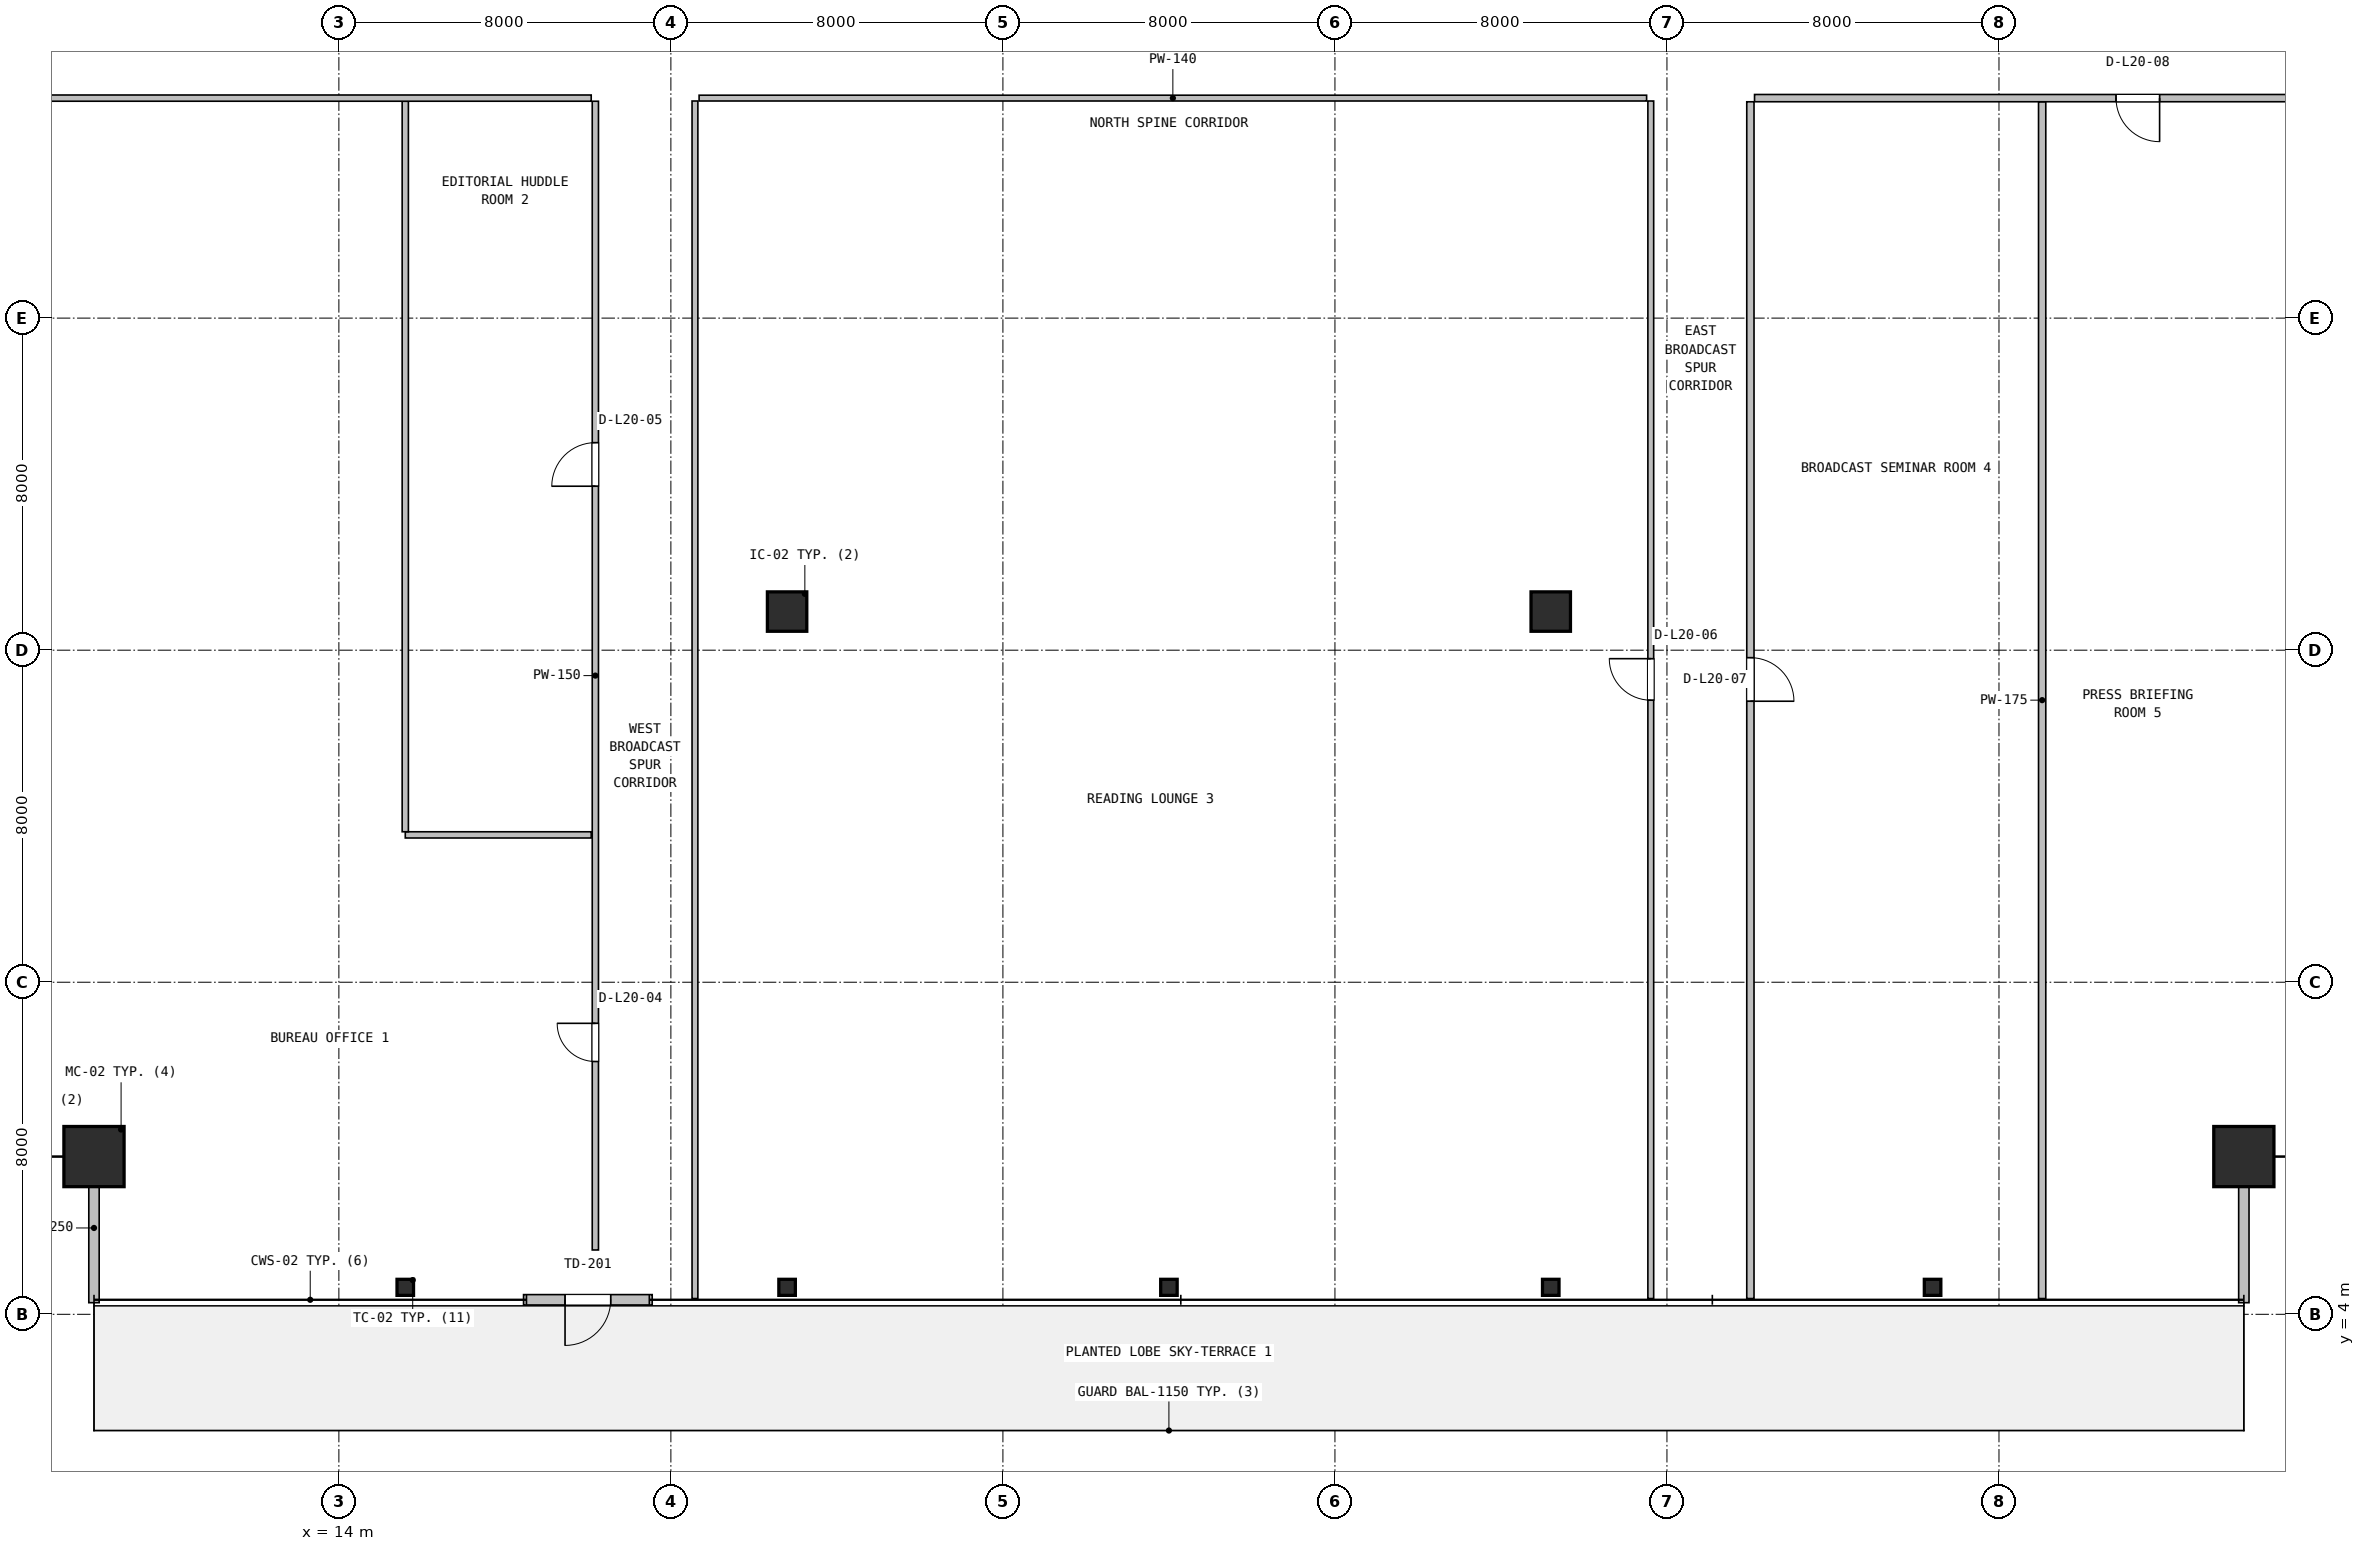
"""IFC4 building model, lengths in metres.
Left out: names, types, materials, properties, quantities, classifications, styles, units other than length and angle.
Written with IfcOpenShell. Run it as: python <this file> out.ifc"""

import sys

from ifc_helpers import new_model, si_unit, direction, frame, frame_2d, origin, origin_2d, place, context, subcontext, project, spatial, rectangle, hollow_rectangle, i_section, extrude, source, transform, mapped, element, fill, save


model = new_model("IFC4")
c1 = context("Model", 3, precision=1e-05, world=origin(), true_north=direction((0.0, 1.0)))
c2 = subcontext(c1, "Body", "Model", "MODEL_VIEW")
j1 = project(units=[si_unit("LENGTHUNIT", "METRE"), si_unit("PLANEANGLEUNIT", "RADIAN")], contexts=[c1])
p1 = place(None, origin())
s1 = spatial("IfcSite", under=j1, at=p1, CompositionType="ELEMENT")
p2 = place(p1, origin())
s2 = spatial("IfcBuilding", under=s1, at=p2, CompositionType="ELEMENT")
p3 = place(p2, frame((0.0, 0.0, 87.0)))
s3 = spatial("IfcBuildingStorey", under=s2, at=p3, CompositionType="ELEMENT", Elevation=87.0)
m1 = source(origin(), c2, "Body", "SweptSolid", [
    extrude(hollow_rectangle(XDim=1.45, YDim=1.45, WallThickness=0.055, at=origin_2d()), origin(), (0.0, 0.0, 1.0), 3.8),
])
for number, where, z_axis, x_axis in (
    (1, (8.1, 7.8, 0.0), (0.0, 0.0, 1.0), (1.0, 0.0, 0.0)),
    (2, (59.9, 7.8, 0.0), (0.0, 0.0, 1.0), (1.0, 0.0, 0.0)),
):
    element("IfcColumn", number, at=place(p3, frame(where, z_axis=z_axis, x_axis=x_axis)), inside=s3, PredefinedType="COLUMN", context=c2, shape_type="MappedRepresentation", body=[
        mapped(m1, transform((0.0, 0.0, 0.0), x_axis=(1.0, 0.0, 0.0), y_axis=(0.0, 1.0, 0.0), z_axis=(0.0, 0.0, 1.0), scale=1.0)),
    ])
m2 = source(origin(), c2, "Body", "SweptSolid", [
    extrude(i_section(OverallWidth=0.398, OverallDepth=0.387, WebThickness=0.021, FlangeThickness=0.033, FilletRadius=0.018, at=origin_2d()), origin(), (0.0, 0.0, 1.0), 3.8),
])
for number, where, z_axis, x_axis in (
    (3, (15.6, 4.65, 0.0), (0.0, 0.0, 1.0), (1.0, 0.0, 0.0)),
    (4, (24.8, 4.65, 0.0), (0.0, 0.0, 1.0), (1.0, 0.0, 0.0)),
    (5, (34.0, 4.65, 0.0), (0.0, 0.0, 1.0), (1.0, 0.0, 0.0)),
    (6, (43.2, 4.65, 0.0), (0.0, 0.0, 1.0), (1.0, 0.0, 0.0)),
    (7, (52.4, 4.65, 0.0), (0.0, 0.0, 1.0), (1.0, 0.0, 0.0)),
):
    element("IfcColumn", number, at=place(p3, frame(where, z_axis=z_axis, x_axis=x_axis)), inside=s3, PredefinedType="COLUMN", context=c2, shape_type="MappedRepresentation", body=[
        mapped(m2, transform((0.0, 0.0, 0.0), x_axis=(1.0, 0.0, 0.0), y_axis=(0.0, 1.0, 0.0), z_axis=(0.0, 0.0, 1.0), scale=1.0)),
    ])
m3 = source(origin(), c2, "Body", "SweptSolid", [
    extrude(rectangle(XDim=0.95, YDim=0.95, at=origin_2d()), origin(), (0.0, 0.0, 1.0), 3.8),
])
for number, where, z_axis, x_axis in (
    (8, (24.8, 20.93, 0.0), (0.0, 0.0, 1.0), (1.0, 0.0, 0.0)),
    (9, (43.2, 20.93, 0.0), (0.0, 0.0, 1.0), (1.0, 0.0, 0.0)),
):
    element("IfcColumn", number, at=place(p3, frame(where, z_axis=z_axis, x_axis=x_axis)), inside=s3, PredefinedType="COLUMN", context=c2, shape_type="MappedRepresentation", body=[
        mapped(m3, transform((0.0, 0.0, 0.0), x_axis=(1.0, 0.0, 0.0), y_axis=(0.0, 1.0, 0.0), z_axis=(0.0, 0.0, 1.0), scale=1.0)),
    ])
p4 = place(p3, frame((18.45, 4.35, 0.0), z_axis=(0.0, 0.0, 1.0), x_axis=(1.0, 0.0, 0.0)))
e10 = element("IfcWall", 10, at=p4, inside=s3, PredefinedType="SOLIDWALL", context=c2, shape_type="SweptSolid", body=[
    extrude(rectangle(XDim=3.1, YDim=0.25, at=frame_2d((1.55, 0.0))), origin(), (0.0, 0.0, 1.0), 3.53),
])
p5 = place(p4, frame((1.0, 0.0, 0.0)))
e11 = element("IfcOpeningElement", 11, at=p5, cuts=e10, PredefinedType="OPENING", context=c2, shape_type="SweptSolid", body=[
    extrude(rectangle(XDim=1.1, YDim=2.15, at=frame_2d((0.55, 1.075))), frame((0.0, 0.135, 0.0), z_axis=(0.0, -1.0, 0.0), x_axis=(1.0, 0.0, 0.0)), (0.0, 0.0, 1.0), 0.27),
])
for number, where, z_axis, x_axis in (
    (12, (8.1, 4.28, 0.0), (0.0, 0.0, 1.0), (0.0, 1.0, 0.0)),
    (13, (59.9, 4.28, 0.0), (0.0, 0.0, 1.0), (0.0, 1.0, 0.0)),
):
    element("IfcWall", number, at=place(p3, frame(where, z_axis=z_axis, x_axis=x_axis)), inside=s3, PredefinedType="SOLIDWALL", context=c2, shape_type="SweptSolid", body=[
        extrude(rectangle(XDim=3.6, YDim=0.25, at=frame_2d((1.8, 0.0))), origin(), (0.0, 0.0, 1.0), 3.108),
    ])
p6 = place(p3, frame((20.18, 5.55, 0.0), z_axis=(0.0, 0.0, 1.0), x_axis=(0.0, 1.0, 0.0)))
e14 = element("IfcWall", 14, at=p6, inside=s3, PredefinedType="PARTITIONING", context=c2, shape_type="SweptSolid", body=[
    extrude(rectangle(XDim=27.675, YDim=0.15, at=frame_2d((13.837, 0.0))), origin(), (0.0, 0.0, 1.0), 3.222),
])
p7 = place(p6, frame((4.54, 0.0, 0.0)))
e15 = element("IfcOpeningElement", 15, at=p7, cuts=e14, PredefinedType="OPENING", context=c2, shape_type="SweptSolid", body=[
    extrude(rectangle(XDim=0.92, YDim=2.08, at=frame_2d((0.46, 1.04))), frame((0.0, 0.085, 0.0), z_axis=(0.0, -1.0, 0.0), x_axis=(1.0, 0.0, 0.0)), (0.0, 0.0, 1.0), 0.17),
])
p8 = place(p6, frame((18.4, 0.0, 0.0)))
e16 = element("IfcOpeningElement", 16, at=p8, cuts=e14, PredefinedType="OPENING", context=c2, shape_type="SweptSolid", body=[
    extrude(rectangle(XDim=1.05, YDim=2.1, at=frame_2d((0.525, 1.05))), frame((0.0, 0.085, 0.0), z_axis=(0.0, -1.0, 0.0), x_axis=(1.0, 0.0, 0.0)), (0.0, 0.0, 1.0), 0.17),
])
p9 = place(p3, frame((15.6, 15.55, 0.0), z_axis=(0.0, 0.0, 1.0), x_axis=(1.0, 0.0, 0.0)))
e17 = element("IfcWall", 17, at=p9, inside=s3, PredefinedType="PARTITIONING", context=c2, shape_type="SweptSolid", body=[
    extrude(rectangle(XDim=4.48, YDim=0.15, at=frame_2d((2.24, 0.0))), origin(), (0.0, 0.0, 1.0), 3.53),
])
p10 = place(p3, frame((15.6, 15.625, 0.0), z_axis=(0.0, 0.0, 1.0), x_axis=(0.0, 1.0, 0.0)))
e18 = element("IfcWall", 18, at=p10, inside=s3, PredefinedType="PARTITIONING", context=c2, shape_type="SweptSolid", body=[
    extrude(rectangle(XDim=17.6, YDim=0.15, at=frame_2d((8.8, 0.0))), origin(), (0.0, 0.0, 1.0), 3.222),
])
p11 = place(p3, frame((4.68, 33.3, 0.0), z_axis=(0.0, 0.0, 1.0), x_axis=(1.0, 0.0, 0.0)))
e19 = element("IfcWall", 19, at=p11, inside=s3, PredefinedType="PARTITIONING", context=c2, shape_type="SweptSolid", body=[
    extrude(rectangle(XDim=15.4, YDim=0.15, at=frame_2d((7.7, 0.0))), origin(), (0.0, 0.0, 1.0), 3.108),
])
p12 = place(p3, frame((45.61, 4.38, 0.0), z_axis=(0.0, 0.0, 1.0), x_axis=(0.0, 1.0, 0.0)))
e20 = element("IfcWall", 20, at=p12, inside=s3, PredefinedType="PARTITIONING", context=c2, shape_type="SweptSolid", body=[
    extrude(rectangle(XDim=28.85, YDim=0.14, at=frame_2d((14.425, 0.0))), origin(), (0.0, 0.0, 1.0), 3.108),
])
p13 = place(p12, frame((14.415, 0.0, 0.0)))
e21 = element("IfcOpeningElement", 21, at=p13, cuts=e20, PredefinedType="OPENING", context=c2, shape_type="SweptSolid", body=[
    extrude(rectangle(XDim=1.0, YDim=2.1, at=frame_2d((0.5, 1.05))), frame((0.0, 0.08, 0.0), z_axis=(0.0, -1.0, 0.0), x_axis=(1.0, 0.0, 0.0)), (0.0, 0.0, 1.0), 0.16),
])
p14 = place(p3, frame((22.68, 33.3, 0.0), z_axis=(0.0, 0.0, 1.0), x_axis=(1.0, 0.0, 0.0)))
e22 = element("IfcWall", 22, at=p14, inside=s3, PredefinedType="PARTITIONING", context=c2, shape_type="SweptSolid", body=[
    extrude(rectangle(XDim=22.83, YDim=0.14, at=frame_2d((11.415, 0.0))), origin(), (0.0, 0.0, 1.0), 2.83),
])
p15 = place(p3, frame((22.58, 4.38, 0.0), z_axis=(0.0, 0.0, 1.0), x_axis=(0.0, 1.0, 0.0)))
e23 = element("IfcWall", 23, at=p15, inside=s3, PredefinedType="PARTITIONING", context=c2, shape_type="SweptSolid", body=[
    extrude(rectangle(XDim=28.85, YDim=0.14, at=frame_2d((14.425, 0.0))), origin(), (0.0, 0.0, 1.0), 3.108),
])
p16 = place(p3, frame((55.04, 4.38, 0.0), z_axis=(0.0, 0.0, 1.0), x_axis=(0.0, 1.0, 0.0)))
e24 = element("IfcWall", 24, at=p16, inside=s3, PredefinedType="PARTITIONING", context=c2, shape_type="SweptSolid", body=[
    extrude(rectangle(XDim=28.832, YDim=0.175, at=frame_2d((14.416, 0.0))), origin(), (0.0, 0.0, 1.0), 3.108),
])
p17 = place(p3, frame((48.11, 33.3, 0.0), z_axis=(0.0, 0.0, 1.0), x_axis=(1.0, 0.0, 0.0)))
e25 = element("IfcWall", 25, at=p17, inside=s3, PredefinedType="PARTITIONING", context=c2, shape_type="SweptSolid", body=[
    extrude(rectangle(XDim=15.21, YDim=0.175, at=frame_2d((7.605, 0.0))), origin(), (0.0, 0.0, 1.0), 3.108),
])
p18 = place(p17, frame((8.71, 0.0, 0.0)))
e26 = element("IfcOpeningElement", 26, at=p18, cuts=e25, PredefinedType="OPENING", context=c2, shape_type="SweptSolid", body=[
    extrude(rectangle(XDim=1.05, YDim=2.1, at=frame_2d((0.525, 1.05))), frame((0.0, 0.098, 0.0), z_axis=(0.0, -1.0, 0.0), x_axis=(1.0, 0.0, 0.0)), (0.0, 0.0, 1.0), 0.195),
])
p19 = place(p3, frame((48.01, 4.38, 0.0), z_axis=(0.0, 0.0, 1.0), x_axis=(0.0, 1.0, 0.0)))
e27 = element("IfcWall", 27, at=p19, inside=s3, PredefinedType="PARTITIONING", context=c2, shape_type="SweptSolid", body=[
    extrude(rectangle(XDim=28.832, YDim=0.175, at=frame_2d((14.416, 0.0))), origin(), (0.0, 0.0, 1.0), 3.108),
])
p20 = place(p19, frame((14.39, 0.0, 0.0)))
e28 = element("IfcOpeningElement", 28, at=p20, cuts=e27, PredefinedType="OPENING", context=c2, shape_type="SweptSolid", body=[
    extrude(rectangle(XDim=1.05, YDim=2.1, at=frame_2d((0.525, 1.05))), frame((0.0, 0.098, 0.0), z_axis=(0.0, -1.0, 0.0), x_axis=(1.0, 0.0, 0.0)), (0.0, 0.0, 1.0), 0.195),
])
m4 = source(origin(), c2, "Body", "SweptSolid", [
    extrude(rectangle(XDim=1.1, YDim=2.15, at=frame_2d((0.55, 1.075))), frame((0.0, 0.025, 0.0), z_axis=(0.0, -1.0, 0.0), x_axis=(1.0, 0.0, 0.0)), (0.0, 0.0, 1.0), 0.05),
])
p21 = place(p5, frame((1.1, 0.0, 0.0), z_axis=(0.0, 0.0, 1.0), x_axis=(-1.0, 0.0, 0.0)))
e29 = element("IfcDoor", 29, at=p21, inside=s3, OperationType="SINGLE_SWING_LEFT", PredefinedType="DOOR", context=c2, shape_type="MappedRepresentation", body=[
    mapped(m4, transform((0.0, 0.0, 0.0), x_axis=(1.0, 0.0, 0.0), y_axis=(0.0, 1.0, 0.0), z_axis=(0.0, 0.0, 1.0), scale=1.0)),
])
fill(e11, e29)
m5 = source(origin(), c2, "Body", "SweptSolid", [
    extrude(rectangle(XDim=0.92, YDim=2.08, at=frame_2d((0.46, 1.04))), frame((0.0, 0.025, 0.0), z_axis=(0.0, -1.0, 0.0), x_axis=(1.0, 0.0, 0.0)), (0.0, 0.0, 1.0), 0.05),
])
p22 = place(p7, origin())
e30 = element("IfcDoor", 30, at=p22, inside=s3, OperationType="SINGLE_SWING_RIGHT", PredefinedType="DOOR", context=c2, shape_type="MappedRepresentation", body=[
    mapped(m5, transform((0.0, 0.0, 0.0), x_axis=(1.0, 0.0, 0.0), y_axis=(0.0, 1.0, 0.0), z_axis=(0.0, 0.0, 1.0), scale=1.0)),
])
fill(e15, e30)
m6 = source(origin(), c2, "Body", "SweptSolid", [
    extrude(rectangle(XDim=1.05, YDim=2.1, at=frame_2d((0.525, 1.05))), frame((0.0, 0.025, 0.0), z_axis=(0.0, -1.0, 0.0), x_axis=(1.0, 0.0, 0.0)), (0.0, 0.0, 1.0), 0.05),
])
p23 = place(p8, origin())
e31 = element("IfcDoor", 31, at=p23, inside=s3, OperationType="SINGLE_SWING_LEFT", PredefinedType="DOOR", context=c2, shape_type="MappedRepresentation", body=[
    mapped(m6, transform((0.0, 0.0, 0.0), x_axis=(1.0, 0.0, 0.0), y_axis=(0.0, 1.0, 0.0), z_axis=(0.0, 0.0, 1.0), scale=1.0)),
])
fill(e16, e31)
m7 = source(origin(), c2, "Body", "SweptSolid", [
    extrude(rectangle(XDim=1.0, YDim=2.1, at=frame_2d((0.5, 1.05))), frame((0.0, 0.025, 0.0), z_axis=(0.0, -1.0, 0.0), x_axis=(1.0, 0.0, 0.0)), (0.0, 0.0, 1.0), 0.05),
])
p24 = place(p13, origin())
e32 = element("IfcDoor", 32, at=p24, inside=s3, OperationType="SINGLE_SWING_RIGHT", PredefinedType="DOOR", context=c2, shape_type="MappedRepresentation", body=[
    mapped(m7, transform((0.0, 0.0, 0.0), x_axis=(1.0, 0.0, 0.0), y_axis=(0.0, 1.0, 0.0), z_axis=(0.0, 0.0, 1.0), scale=1.0)),
])
fill(e21, e32)
p25 = place(p20, frame((1.05, 0.0, 0.0), z_axis=(0.0, 0.0, 1.0), x_axis=(-1.0, 0.0, 0.0)))
e33 = element("IfcDoor", 33, at=p25, inside=s3, OperationType="SINGLE_SWING_LEFT", PredefinedType="DOOR", context=c2, shape_type="MappedRepresentation", body=[
    mapped(m6, transform((0.0, 0.0, 0.0), x_axis=(1.0, 0.0, 0.0), y_axis=(0.0, 1.0, 0.0), z_axis=(0.0, 0.0, 1.0), scale=1.0)),
])
fill(e28, e33)
p26 = place(p18, frame((1.05, 0.0, 0.0), z_axis=(0.0, 0.0, 1.0), x_axis=(-1.0, 0.0, 0.0)))
e34 = element("IfcDoor", 34, at=p26, inside=s3, OperationType="SINGLE_SWING_RIGHT", PredefinedType="DOOR", context=c2, shape_type="MappedRepresentation", body=[
    mapped(m6, transform((0.0, 0.0, 0.0), x_axis=(1.0, 0.0, 0.0), y_axis=(0.0, 1.0, 0.0), z_axis=(0.0, 0.0, 1.0), scale=1.0)),
])
fill(e26, e34)
save(model, sys.argv[1])
